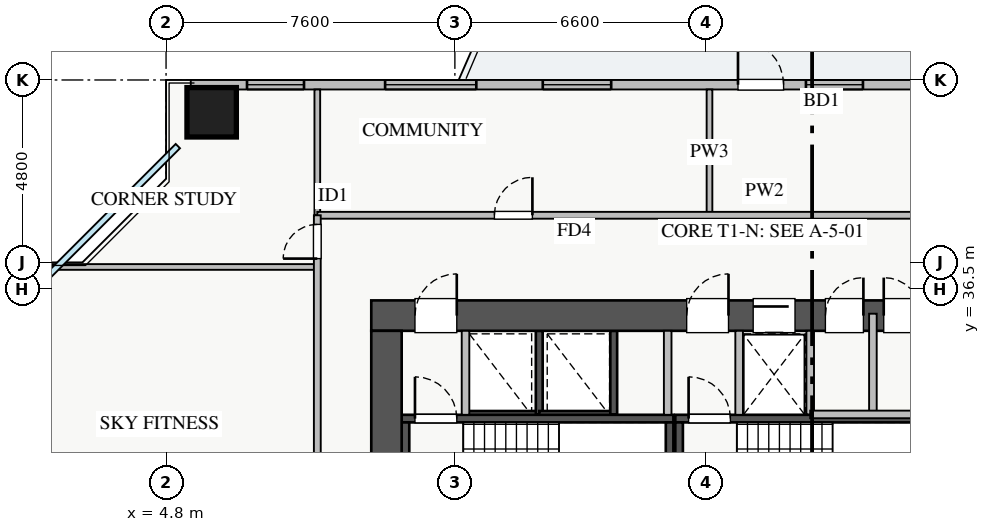
"""IFC4 building model, lengths in metres.
Left out: names, types, materials, properties, quantities, classifications, styles, units other than length and angle.
Written with IfcOpenShell. Run it as: python <this file> out.ifc"""

import sys

from ifc_helpers import new_model, si_unit, direction, frame, frame_2d, origin, origin_2d, place, context, subcontext, project, spatial, rectangle, extrude, source, transform, mapped, element, fill, save


model = new_model("IFC4")
c1 = context("Model", 3, precision=1e-05, world=origin(), true_north=direction((0.0, 1.0)))
c2 = subcontext(c1, "Body", "Model", "MODEL_VIEW")
j1 = project(units=[si_unit("LENGTHUNIT", "METRE"), si_unit("PLANEANGLEUNIT", "RADIAN")], contexts=[c1])
p1 = place(None, origin())
s1 = spatial("IfcSite", under=j1, at=p1, CompositionType="ELEMENT")
p2 = place(p1, origin())
s2 = spatial("IfcBuilding", under=s1, at=p2, CompositionType="ELEMENT")
p3 = place(p2, frame((0.0, 0.0, 23.0)))
s3 = spatial("IfcBuildingStorey", under=s2, at=p3, CompositionType="ELEMENT", Elevation=23.0)
p4 = place(p3, frame((12.68, 33.2, 0.0), z_axis=(0.0, 0.0, 1.0), x_axis=(1.0, 0.0, 0.0)))
e1 = element("IfcWall", 1, at=p4, inside=s3, PredefinedType="SHEAR", context=c2, shape_type="SweptSolid", body=[
    extrude(rectangle(XDim=1.94, YDim=0.18, at=frame_2d((0.97, 0.0))), origin(), (0.0, 0.0, 1.0), 3.07),
])
p5 = place(p3, frame((14.62, 33.2, 0.0), z_axis=(0.0, 0.0, 1.0), x_axis=(0.0, 1.0, 0.0)))
e2 = element("IfcWall", 2, at=p5, inside=s3, PredefinedType="SHEAR", context=c2, shape_type="SweptSolid", body=[
    extrude(rectangle(XDim=2.2, YDim=0.18, at=frame_2d((1.1, 0.0))), origin(), (0.0, 0.0, 1.0), 3.07),
])
p6 = place(p3, frame((14.62, 33.2, 0.0), z_axis=(0.0, 0.0, 1.0), x_axis=(1.0, 0.0, 0.0)))
e3 = element("IfcWall", 3, at=p6, inside=s3, PredefinedType="SHEAR", context=c2, shape_type="SweptSolid", body=[
    extrude(rectangle(XDim=1.96, YDim=0.18, at=frame_2d((0.98, 0.0))), origin(), (0.0, 0.0, 1.0), 3.07),
])
p7 = place(p3, frame((16.58, 33.2, 0.0), z_axis=(0.0, 0.0, 1.0), x_axis=(0.0, 1.0, 0.0)))
e4 = element("IfcWall", 4, at=p7, inside=s3, PredefinedType="SHEAR", context=c2, shape_type="SweptSolid", body=[
    extrude(rectangle(XDim=2.2, YDim=0.18, at=frame_2d((1.1, 0.0))), origin(), (0.0, 0.0, 1.0), 3.07),
])
p8 = place(p3, frame((19.88, 33.2, 0.0), z_axis=(0.0, 0.0, 1.0), x_axis=(1.0, 0.0, 0.0)))
e5 = element("IfcWall", 5, at=p8, inside=s3, PredefinedType="SHEAR", context=c2, shape_type="SweptSolid", body=[
    extrude(rectangle(XDim=1.87, YDim=0.18, at=frame_2d((0.935, 0.0))), origin(), (0.0, 0.0, 1.0), 3.07),
])
p9 = place(p3, frame((11.0, 33.09, 0.0), z_axis=(0.0, 0.0, 1.0), x_axis=(1.0, 0.0, 0.0)))
e6 = element("IfcWall", 6, at=p9, inside=s3, PredefinedType="SHEAR", context=c2, shape_type="SweptSolid", body=[
    extrude(rectangle(XDim=7.15, YDim=0.2, at=frame_2d((3.575, 0.0))), origin(), (0.0, 0.0, 1.0), 3.25),
])
p10 = place(p9, frame((0.35, 0.0, 0.0)))
e7 = element("IfcOpeningElement", 7, at=p10, cuts=e6, PredefinedType="OPENING", context=c2, shape_type="SweptSolid", body=[
    extrude(rectangle(XDim=1.1, YDim=2.05, at=frame_2d((0.55, 1.025))), frame((0.0, 0.11, 0.0), z_axis=(0.0, -1.0, 0.0), x_axis=(1.0, 0.0, 0.0)), (0.0, 0.0, 1.0), 0.22),
])
for number, where, z_axis, x_axis in (
    (8, (11.1, 30.05, 0.0), (0.0, 0.0, 1.0), (0.0, 1.0, 0.0)),
    (9, (18.05, 30.05, 0.0), (0.0, 0.0, 1.0), (0.0, 1.0, 0.0)),
):
    element("IfcWall", number, at=place(p3, frame(where, z_axis=z_axis, x_axis=x_axis)), inside=s3, PredefinedType="SHEAR", context=c2, shape_type="SweptSolid", body=[
        extrude(rectangle(XDim=2.94, YDim=0.2, at=frame_2d((1.47, 0.0))), origin(), (0.0, 0.0, 1.0), 3.25),
    ])
p11 = place(p3, frame((18.2, 33.09, 0.0), z_axis=(0.0, 0.0, 1.0), x_axis=(1.0, 0.0, 0.0)))
e10 = element("IfcWall", 10, at=p11, inside=s3, PredefinedType="SHEAR", context=c2, shape_type="SweptSolid", body=[
    extrude(rectangle(XDim=7.15, YDim=0.2, at=frame_2d((3.575, 0.0))), origin(), (0.0, 0.0, 1.0), 3.25),
])
p12 = place(p11, frame((0.35, 0.0, 0.0)))
e11 = element("IfcOpeningElement", 11, at=p12, cuts=e10, PredefinedType="OPENING", context=c2, shape_type="SweptSolid", body=[
    extrude(rectangle(XDim=1.1, YDim=2.05, at=frame_2d((0.55, 1.025))), frame((0.0, 0.11, 0.0), z_axis=(0.0, -1.0, 0.0), x_axis=(1.0, 0.0, 0.0)), (0.0, 0.0, 1.0), 0.22),
])
p13 = place(p3, frame((18.3, 30.05, 0.0), z_axis=(0.0, 0.0, 1.0), x_axis=(0.0, 1.0, 0.0)))
e12 = element("IfcWall", 12, at=p13, inside=s3, PredefinedType="SHEAR", context=c2, shape_type="SweptSolid", body=[
    extrude(rectangle(XDim=2.94, YDim=0.2, at=frame_2d((1.47, 0.0))), origin(), (0.0, 0.0, 1.0), 3.25),
])
p14 = place(p3, frame((10.2, 35.8, 0.0), z_axis=(0.0, 0.0, 1.0), x_axis=(1.0, 0.0, 0.0)))
e13 = element("IfcWall", 13, at=p14, inside=s3, PredefinedType="SHEAR", context=c2, shape_type="SweptSolid", body=[
    extrude(rectangle(XDim=17.6, YDim=0.8, at=frame_2d((8.8, 0.0))), origin(), (0.0, 0.0, 1.0), 3.25),
])
p15 = place(p14, frame((1.15, 0.0, 0.0)))
e14 = element("IfcOpeningElement", 14, at=p15, cuts=e13, PredefinedType="OPENING", context=c2, shape_type="SweptSolid", body=[
    extrude(rectangle(XDim=1.1, YDim=2.05, at=frame_2d((0.55, 1.025))), frame((0.0, 0.41, 0.0), z_axis=(0.0, -1.0, 0.0), x_axis=(1.0, 0.0, 0.0)), (0.0, 0.0, 1.0), 0.82),
])
p16 = place(p14, frame((8.3, 0.0, 0.0)))
e15 = element("IfcOpeningElement", 15, at=p16, cuts=e13, PredefinedType="OPENING", context=c2, shape_type="SweptSolid", body=[
    extrude(rectangle(XDim=1.1, YDim=2.05, at=frame_2d((0.55, 1.025))), frame((0.0, 0.41, 0.0), z_axis=(0.0, -1.0, 0.0), x_axis=(1.0, 0.0, 0.0)), (0.0, 0.0, 1.0), 0.82),
])
p17 = place(p14, frame((10.05, 0.0, 0.0)))
e16 = element("IfcOpeningElement", 16, at=p17, cuts=e13, PredefinedType="OPENING", context=c2, shape_type="SweptSolid", body=[
    extrude(rectangle(XDim=1.1, YDim=2.05, at=frame_2d((0.55, 1.025))), frame((0.0, 0.41, 0.0), z_axis=(0.0, -1.0, 0.0), x_axis=(1.0, 0.0, 0.0)), (0.0, 0.0, 1.0), 0.82),
])
p18 = place(p14, frame((14.74, 0.0, 0.0)))
e17 = element("IfcOpeningElement", 17, at=p18, cuts=e13, PredefinedType="OPENING", context=c2, shape_type="SweptSolid", body=[
    extrude(rectangle(XDim=1.0, YDim=2.05, at=frame_2d((0.5, 1.025))), frame((0.0, 0.41, 0.0), z_axis=(0.0, -1.0, 0.0), x_axis=(1.0, 0.0, 0.0)), (0.0, 0.0, 1.0), 0.82),
])
p19 = place(p14, frame((11.95, 0.0, 0.0)))
e18 = element("IfcOpeningElement", 18, at=p19, cuts=e13, PredefinedType="OPENING", context=c2, shape_type="SweptSolid", body=[
    extrude(rectangle(XDim=1.0, YDim=2.05, at=frame_2d((0.5, 1.025))), frame((0.0, 0.41, 0.0), z_axis=(0.0, -1.0, 0.0), x_axis=(1.0, 0.0, 0.0)), (0.0, 0.0, 1.0), 0.82),
])
p20 = place(p14, frame((13.485, 0.0, 0.0)))
e19 = element("IfcOpeningElement", 19, at=p20, cuts=e13, PredefinedType="OPENING", context=c2, shape_type="SweptSolid", body=[
    extrude(rectangle(XDim=1.0, YDim=2.05, at=frame_2d((0.5, 1.025))), frame((0.0, 0.41, 0.0), z_axis=(0.0, -1.0, 0.0), x_axis=(1.0, 0.0, 0.0)), (0.0, 0.0, 1.0), 0.82),
])
p21 = place(p3, frame((10.6, 29.8, 0.0), z_axis=(0.0, 0.0, 1.0), x_axis=(0.0, 1.0, 0.0)))
e20 = element("IfcWall", 20, at=p21, inside=s3, PredefinedType="SHEAR", context=c2, shape_type="SweptSolid", body=[
    extrude(rectangle(XDim=5.6, YDim=0.8, at=frame_2d((2.8, 0.0))), origin(), (0.0, 0.0, 1.0), 3.25),
])
m1 = source(origin(), c2, "Body", "SweptSolid", [
    extrude(rectangle(XDim=1.3, YDim=1.3, at=origin_2d()), origin(), (0.0, 0.0, 1.0), 3.25),
])
p22 = place(p3, frame((6.0, 41.15, 0.0), z_axis=(0.0, 0.0, 1.0), x_axis=(1.0, 0.0, 0.0)))
e21 = element("IfcColumn", 21, at=p22, inside=s3, PredefinedType="COLUMN", context=c2, shape_type="MappedRepresentation", body=[
    mapped(m1, transform((0.0, 0.0, 0.0), x_axis=(1.0, 0.0, 0.0), y_axis=(0.0, 1.0, 0.0), z_axis=(0.0, 0.0, 1.0), scale=1.0)),
])
p23 = place(p3, frame((5.45, 41.875, 0.0), z_axis=(0.0, 0.0, 1.0), x_axis=(1.0, 0.0, 0.0)))
e22 = element("IfcWall", 22, at=p23, inside=s3, PredefinedType="STANDARD", context=c2, shape_type="SweptSolid", body=[
    extrude(rectangle(XDim=27.1, YDim=0.25, at=frame_2d((13.55, 0.0))), origin(), (0.0, 0.0, 1.0), 2.61),
])
p24 = place(p23, frame((14.4, 0.0, 0.0)))
e23 = element("IfcOpeningElement", 23, at=p24, cuts=e22, PredefinedType="OPENING", context=c2, shape_type="SweptSolid", body=[
    extrude(rectangle(XDim=1.2, YDim=2.1, at=frame_2d((0.6, 1.05))), frame((0.0, 0.135, 0.0), z_axis=(0.0, -1.0, 0.0), x_axis=(1.0, 0.0, 0.0)), (0.0, 0.0, 1.0), 0.27),
])
p25 = place(p23, frame((1.48, 0.0, 0.9)))
e24 = element("IfcOpeningElement", 24, at=p25, cuts=e22, PredefinedType="OPENING", context=c2, shape_type="SweptSolid", body=[
    extrude(rectangle(XDim=1.5, YDim=1.5, at=frame_2d((0.75, 0.75))), frame((0.0, 0.135, 0.0), z_axis=(0.0, -1.0, 0.0), x_axis=(1.0, 0.0, 0.0)), (0.0, 0.0, 1.0), 0.27),
])
p26 = place(p23, frame((9.263, 0.0, 0.9)))
e25 = element("IfcOpeningElement", 25, at=p26, cuts=e22, PredefinedType="OPENING", context=c2, shape_type="SweptSolid", body=[
    extrude(rectangle(XDim=1.8, YDim=1.45, at=frame_2d((0.9, 0.725))), frame((0.0, 0.135, 0.0), z_axis=(0.0, -1.0, 0.0), x_axis=(1.0, 0.0, 0.0)), (0.0, 0.0, 1.0), 0.27),
])
p27 = place(p23, frame((16.188, 0.0, 0.9)))
e26 = element("IfcOpeningElement", 26, at=p27, cuts=e22, PredefinedType="OPENING", context=c2, shape_type="SweptSolid", body=[
    extrude(rectangle(XDim=1.5, YDim=1.45, at=frame_2d((0.75, 0.725))), frame((0.0, 0.135, 0.0), z_axis=(0.0, -1.0, 0.0), x_axis=(1.0, 0.0, 0.0)), (0.0, 0.0, 1.0), 0.27),
])
p28 = place(p23, frame((22.663, 0.0, 0.9)))
e27 = element("IfcOpeningElement", 27, at=p28, cuts=e22, PredefinedType="OPENING", context=c2, shape_type="SweptSolid", body=[
    extrude(rectangle(XDim=2.1, YDim=1.48, at=frame_2d((1.05, 0.74))), frame((0.0, 0.135, 0.0), z_axis=(0.0, -1.0, 0.0), x_axis=(1.0, 0.0, 0.0)), (0.0, 0.0, 1.0), 0.27),
])
p29 = place(p23, frame((5.114, 0.0, 0.9)))
e28 = element("IfcOpeningElement", 28, at=p29, cuts=e22, PredefinedType="OPENING", context=c2, shape_type="SweptSolid", body=[
    extrude(rectangle(XDim=2.4, YDim=1.5, at=frame_2d((1.2, 0.75))), frame((0.0, 0.135, 0.0), z_axis=(0.0, -1.0, 0.0), x_axis=(1.0, 0.0, 0.0)), (0.0, 0.0, 1.0), 0.27),
])
for number, where, z_axis, x_axis in (
    (29, (12.68, 33.19, 0.0), (0.0, 0.0, 1.0), (0.0, 1.0, 0.0)),
    (30, (18.0, 33.19, 0.0), (0.0, 0.0, 1.0), (0.0, 1.0, 0.0)),
    (31, (19.88, 33.19, 0.0), (0.0, 0.0, 1.0), (0.0, 1.0, 0.0)),
):
    element("IfcWall", number, at=place(p3, frame(where, z_axis=z_axis, x_axis=x_axis)), inside=s3, PredefinedType="PARTITIONING", context=c2, shape_type="SweptSolid", body=[
        extrude(rectangle(XDim=2.21, YDim=0.2, at=frame_2d((1.105, 0.0))), origin(), (0.0, 0.0, 1.0), 3.07),
    ])
p30 = place(p3, frame((21.75, 33.2, 0.0), z_axis=(0.0, 0.0, 1.0), x_axis=(0.0, 1.0, 0.0)))
e32 = element("IfcWall", 32, at=p30, inside=s3, PredefinedType="PARTITIONING", context=c2, shape_type="SweptSolid", body=[
    extrude(rectangle(XDim=2.2, YDim=0.2, at=frame_2d((1.1, 0.0))), origin(), (0.0, 0.0, 1.0), 3.07),
])
p31 = place(p3, frame((23.4, 33.2, 0.0), z_axis=(0.0, 0.0, 1.0), x_axis=(0.0, 1.0, 0.0)))
e33 = element("IfcWall", 33, at=p31, inside=s3, PredefinedType="PARTITIONING", context=c2, shape_type="SweptSolid", body=[
    extrude(rectangle(XDim=2.65, YDim=0.2, at=frame_2d((1.325, 0.0))), origin(), (0.0, 0.0, 1.0), 3.07),
])
p32 = place(p3, frame((21.75, 33.2, 0.0), z_axis=(0.0, 0.0, 1.0), x_axis=(1.0, 0.0, 0.0)))
e34 = element("IfcWall", 34, at=p32, inside=s3, PredefinedType="PARTITIONING", context=c2, shape_type="SweptSolid", body=[
    extrude(rectangle(XDim=5.17, YDim=0.2, at=frame_2d((2.585, 0.0))), origin(), (0.0, 0.0, 1.0), 3.07),
])
p33 = place(p3, frame((19.1, 38.44, 0.0), z_axis=(0.0, 0.0, 1.0), x_axis=(0.0, 1.0, 0.0)))
e35 = element("IfcWall", 35, at=p33, inside=s3, PredefinedType="PARTITIONING", context=c2, shape_type="SweptSolid", body=[
    extrude(rectangle(XDim=3.31, YDim=0.15, at=frame_2d((1.655, 0.0))), origin(), (0.0, 0.0, 1.0), 2.865),
])
p34 = place(p3, frame((8.78, 38.44, 0.0), z_axis=(0.0, 0.0, 1.0), x_axis=(0.0, 1.0, 0.0)))
e36 = element("IfcWall", 36, at=p34, inside=s3, PredefinedType="PARTITIONING", context=c2, shape_type="SweptSolid", body=[
    extrude(rectangle(XDim=3.31, YDim=0.15, at=frame_2d((1.655, 0.0))), origin(), (0.0, 0.0, 1.0), 3.07),
])
p35 = place(p3, frame((8.78, 38.44, 0.0), z_axis=(0.0, 0.0, 1.0), x_axis=(1.0, 0.0, 0.0)))
e37 = element("IfcWall", 37, at=p35, inside=s3, PredefinedType="PARTITIONING", context=c2, shape_type="SweptSolid", body=[
    extrude(rectangle(XDim=23.54, YDim=0.18, at=frame_2d((11.77, 0.0))), origin(), (0.0, 0.0, 1.0), 3.07),
])
p36 = place(p35, frame((4.66, 0.0, 0.0)))
e38 = element("IfcOpeningElement", 38, at=p36, cuts=e37, PredefinedType="OPENING", context=c2, shape_type="SweptSolid", body=[
    extrude(rectangle(XDim=1.0, YDim=2.05, at=frame_2d((0.5, 1.025))), frame((0.0, 0.1, 0.0), z_axis=(0.0, -1.0, 0.0), x_axis=(1.0, 0.0, 0.0)), (0.0, 0.0, 1.0), 0.2),
])
p37 = place(p35, frame((16.43, 0.0, 0.0)))
e39 = element("IfcOpeningElement", 39, at=p37, cuts=e37, PredefinedType="OPENING", context=c2, shape_type="SweptSolid", body=[
    extrude(rectangle(XDim=1.0, YDim=2.05, at=frame_2d((0.5, 1.025))), frame((0.0, 0.1, 0.0), z_axis=(0.0, -1.0, 0.0), x_axis=(1.0, 0.0, 0.0)), (0.0, 0.0, 1.0), 0.2),
])
p38 = place(p3, frame((0.25, 37.08, 0.0), z_axis=(0.0, 0.0, 1.0), x_axis=(1.0, 0.0, 0.0)))
e40 = element("IfcWall", 40, at=p38, inside=s3, PredefinedType="PARTITIONING", context=c2, shape_type="SweptSolid", body=[
    extrude(rectangle(XDim=8.53, YDim=0.15, at=frame_2d((4.265, 0.0))), origin(), (0.0, 0.0, 1.0), 3.07),
])
p39 = place(p3, frame((8.78, 7.21, 0.0), z_axis=(0.0, 0.0, 1.0), x_axis=(0.0, 1.0, 0.0)))
e41 = element("IfcWall", 41, at=p39, inside=s3, PredefinedType="PARTITIONING", context=c2, shape_type="SweptSolid", body=[
    extrude(rectangle(XDim=31.23, YDim=0.18, at=frame_2d((15.615, 0.0))), origin(), (0.0, 0.0, 1.0), 3.07),
])
p40 = place(p39, frame((30.09, 0.0, 0.0)))
e42 = element("IfcOpeningElement", 42, at=p40, cuts=e41, PredefinedType="OPENING", context=c2, shape_type="SweptSolid", body=[
    extrude(rectangle(XDim=0.9, YDim=2.05, at=frame_2d((0.45, 1.025))), frame((0.0, 0.1, 0.0), z_axis=(0.0, -1.0, 0.0), x_axis=(1.0, 0.0, 0.0)), (0.0, 0.0, 1.0), 0.2),
])
p41 = place(p39, frame((0.24, 0.0, 0.0)))
e43 = element("IfcOpeningElement", 43, at=p41, cuts=e41, PredefinedType="OPENING", context=c2, shape_type="SweptSolid", body=[
    extrude(rectangle(XDim=0.9, YDim=2.05, at=frame_2d((0.45, 1.025))), frame((0.0, 0.1, 0.0), z_axis=(0.0, -1.0, 0.0), x_axis=(1.0, 0.0, 0.0)), (0.0, 0.0, 1.0), 0.2),
])
p42 = place(p39, frame((3.975, 0.0, 0.0)))
e44 = element("IfcOpeningElement", 44, at=p42, cuts=e41, PredefinedType="OPENING", context=c2, shape_type="SweptSolid", body=[
    extrude(rectangle(XDim=1.0, YDim=2.05, at=frame_2d((0.5, 1.025))), frame((0.0, 0.1, 0.0), z_axis=(0.0, -1.0, 0.0), x_axis=(1.0, 0.0, 0.0)), (0.0, 0.0, 1.0), 0.2),
])
p43 = place(p39, frame((22.0, 0.0, 0.0)))
e45 = element("IfcOpeningElement", 45, at=p43, cuts=e41, PredefinedType="OPENING", context=c2, shape_type="SweptSolid", body=[
    extrude(rectangle(XDim=1.0, YDim=2.05, at=frame_2d((0.5, 1.025))), frame((0.0, 0.1, 0.0), z_axis=(0.0, -1.0, 0.0), x_axis=(1.0, 0.0, 0.0)), (0.0, 0.0, 1.0), 0.2),
])
m2 = source(origin(), c2, "Body", "SweptSolid", [
    extrude(rectangle(XDim=1.2, YDim=2.1, at=frame_2d((0.6, 1.05))), frame((0.0, 0.025, 0.0), z_axis=(0.0, -1.0, 0.0), x_axis=(1.0, 0.0, 0.0)), (0.0, 0.0, 1.0), 0.05),
])
p44 = place(p24, origin())
e46 = element("IfcDoor", 46, at=p44, inside=s3, OperationType="SINGLE_SWING_LEFT", PredefinedType="DOOR", context=c2, shape_type="MappedRepresentation", body=[
    mapped(m2, transform((0.0, 0.0, 0.0), x_axis=(1.0, 0.0, 0.0), y_axis=(0.0, 1.0, 0.0), z_axis=(0.0, 0.0, 1.0), scale=1.0)),
])
fill(e23, e46)
m3 = source(origin(), c2, "Body", "SweptSolid", [
    extrude(rectangle(XDim=1.5, YDim=1.5, at=frame_2d((0.75, 0.75))), frame((0.0, 0.03, 0.0), z_axis=(0.0, -1.0, 0.0), x_axis=(1.0, 0.0, 0.0)), (0.0, 0.0, 1.0), 0.06),
])
p45 = place(p25, origin())
e47 = element("IfcWindow", 47, at=p45, inside=s3, PartitioningType="TRIPLE_PANEL_VERTICAL", PredefinedType="WINDOW", context=c2, shape_type="MappedRepresentation", body=[
    mapped(m3, transform((0.0, 0.0, 0.0), x_axis=(1.0, 0.0, 0.0), y_axis=(0.0, 1.0, 0.0), z_axis=(0.0, 0.0, 1.0), scale=1.0)),
])
fill(e24, e47)
m4 = source(origin(), c2, "Body", "SweptSolid", [
    extrude(rectangle(XDim=1.8, YDim=1.45, at=frame_2d((0.9, 0.725))), frame((0.0, 0.03, 0.0), z_axis=(0.0, -1.0, 0.0), x_axis=(1.0, 0.0, 0.0)), (0.0, 0.0, 1.0), 0.06),
])
p46 = place(p26, origin())
e48 = element("IfcWindow", 48, at=p46, inside=s3, PartitioningType="DOUBLE_PANEL_VERTICAL", PredefinedType="WINDOW", context=c2, shape_type="MappedRepresentation", body=[
    mapped(m4, transform((0.0, 0.0, 0.0), x_axis=(1.0, 0.0, 0.0), y_axis=(0.0, 1.0, 0.0), z_axis=(0.0, 0.0, 1.0), scale=1.0)),
])
fill(e25, e48)
m5 = source(origin(), c2, "Body", "SweptSolid", [
    extrude(rectangle(XDim=1.5, YDim=1.45, at=frame_2d((0.75, 0.725))), frame((0.0, 0.03, 0.0), z_axis=(0.0, -1.0, 0.0), x_axis=(1.0, 0.0, 0.0)), (0.0, 0.0, 1.0), 0.06),
])
p47 = place(p27, origin())
e49 = element("IfcWindow", 49, at=p47, inside=s3, PartitioningType="DOUBLE_PANEL_VERTICAL", PredefinedType="WINDOW", context=c2, shape_type="MappedRepresentation", body=[
    mapped(m5, transform((0.0, 0.0, 0.0), x_axis=(1.0, 0.0, 0.0), y_axis=(0.0, 1.0, 0.0), z_axis=(0.0, 0.0, 1.0), scale=1.0)),
])
fill(e26, e49)
m6 = source(origin(), c2, "Body", "SweptSolid", [
    extrude(rectangle(XDim=1.1, YDim=2.05, at=frame_2d((0.55, 1.025))), frame((0.0, 0.025, 0.0), z_axis=(0.0, -1.0, 0.0), x_axis=(1.0, 0.0, 0.0)), (0.0, 0.0, 1.0), 0.05),
])
p48 = place(p15, origin())
e50 = element("IfcDoor", 50, at=p48, inside=s3, OperationType="SINGLE_SWING_RIGHT", PredefinedType="DOOR", context=c2, shape_type="MappedRepresentation", body=[
    mapped(m6, transform((0.0, 0.0, 0.0), x_axis=(1.0, 0.0, 0.0), y_axis=(0.0, 1.0, 0.0), z_axis=(0.0, 0.0, 1.0), scale=1.0)),
])
fill(e14, e50)
p49 = place(p10, origin())
e51 = element("IfcDoor", 51, at=p49, inside=s3, OperationType="SINGLE_SWING_LEFT", PredefinedType="DOOR", context=c2, shape_type="MappedRepresentation", body=[
    mapped(m6, transform((0.0, 0.0, 0.0), x_axis=(1.0, 0.0, 0.0), y_axis=(0.0, 1.0, 0.0), z_axis=(0.0, 0.0, 1.0), scale=1.0)),
])
fill(e7, e51)
p50 = place(p16, origin())
e52 = element("IfcDoor", 52, at=p50, inside=s3, OperationType="SINGLE_SWING_RIGHT", PredefinedType="DOOR", context=c2, shape_type="MappedRepresentation", body=[
    mapped(m6, transform((0.0, 0.0, 0.0), x_axis=(1.0, 0.0, 0.0), y_axis=(0.0, 1.0, 0.0), z_axis=(0.0, 0.0, 1.0), scale=1.0)),
])
fill(e15, e52)
p51 = place(p12, origin())
e53 = element("IfcDoor", 53, at=p51, inside=s3, OperationType="SINGLE_SWING_LEFT", PredefinedType="DOOR", context=c2, shape_type="MappedRepresentation", body=[
    mapped(m6, transform((0.0, 0.0, 0.0), x_axis=(1.0, 0.0, 0.0), y_axis=(0.0, 1.0, 0.0), z_axis=(0.0, 0.0, 1.0), scale=1.0)),
])
fill(e11, e53)
p52 = place(p17, origin())
e54 = element("IfcDoor", 54, at=p52, inside=s3, OperationType="SLIDING_TO_LEFT", PredefinedType="DOOR", context=c2, shape_type="MappedRepresentation", body=[
    mapped(m6, transform((0.0, 0.0, 0.0), x_axis=(1.0, 0.0, 0.0), y_axis=(0.0, 1.0, 0.0), z_axis=(0.0, 0.0, 1.0), scale=1.0)),
])
fill(e16, e54)
m7 = source(origin(), c2, "Body", "SweptSolid", [
    extrude(rectangle(XDim=1.0, YDim=2.05, at=frame_2d((0.5, 1.025))), frame((0.0, 0.025, 0.0), z_axis=(0.0, -1.0, 0.0), x_axis=(1.0, 0.0, 0.0)), (0.0, 0.0, 1.0), 0.05),
])
p53 = place(p19, origin())
e55 = element("IfcDoor", 55, at=p53, inside=s3, OperationType="SINGLE_SWING_RIGHT", PredefinedType="DOOR", context=c2, shape_type="MappedRepresentation", body=[
    mapped(m7, transform((0.0, 0.0, 0.0), x_axis=(1.0, 0.0, 0.0), y_axis=(0.0, 1.0, 0.0), z_axis=(0.0, 0.0, 1.0), scale=1.0)),
])
fill(e18, e55)
p54 = place(p20, origin())
e56 = element("IfcDoor", 56, at=p54, inside=s3, OperationType="SINGLE_SWING_LEFT", PredefinedType="DOOR", context=c2, shape_type="MappedRepresentation", body=[
    mapped(m7, transform((0.0, 0.0, 0.0), x_axis=(1.0, 0.0, 0.0), y_axis=(0.0, 1.0, 0.0), z_axis=(0.0, 0.0, 1.0), scale=1.0)),
])
fill(e19, e56)
p55 = place(p36, origin())
e57 = element("IfcDoor", 57, at=p55, inside=s3, OperationType="SINGLE_SWING_RIGHT", PredefinedType="DOOR", context=c2, shape_type="MappedRepresentation", body=[
    mapped(m7, transform((0.0, 0.0, 0.0), x_axis=(1.0, 0.0, 0.0), y_axis=(0.0, 1.0, 0.0), z_axis=(0.0, 0.0, 1.0), scale=1.0)),
])
fill(e38, e57)
m8 = source(origin(), c2, "Body", "SweptSolid", [
    extrude(rectangle(XDim=0.9, YDim=2.05, at=frame_2d((0.45, 1.025))), frame((0.0, 0.025, 0.0), z_axis=(0.0, -1.0, 0.0), x_axis=(1.0, 0.0, 0.0)), (0.0, 0.0, 1.0), 0.05),
])
p56 = place(p40, origin())
e58 = element("IfcDoor", 58, at=p56, inside=s3, OperationType="SINGLE_SWING_LEFT", PredefinedType="DOOR", context=c2, shape_type="MappedRepresentation", body=[
    mapped(m8, transform((0.0, 0.0, 0.0), x_axis=(1.0, 0.0, 0.0), y_axis=(0.0, 1.0, 0.0), z_axis=(0.0, 0.0, 1.0), scale=1.0)),
])
fill(e42, e58)
m9 = source(origin(), c2, "Body", "SweptSolid", [
    extrude(rectangle(XDim=2.4, YDim=1.5, at=frame_2d((1.2, 0.75))), frame((0.0, 0.03, 0.0), z_axis=(0.0, -1.0, 0.0), x_axis=(1.0, 0.0, 0.0)), (0.0, 0.0, 1.0), 0.06),
])
p57 = place(p29, origin())
e59 = element("IfcWindow", 59, at=p57, inside=s3, PartitioningType="TRIPLE_PANEL_VERTICAL", PredefinedType="WINDOW", context=c2, shape_type="MappedRepresentation", body=[
    mapped(m9, transform((0.0, 0.0, 0.0), x_axis=(1.0, 0.0, 0.0), y_axis=(0.0, 1.0, 0.0), z_axis=(0.0, 0.0, 1.0), scale=1.0)),
])
fill(e28, e59)
save(model, sys.argv[1])
